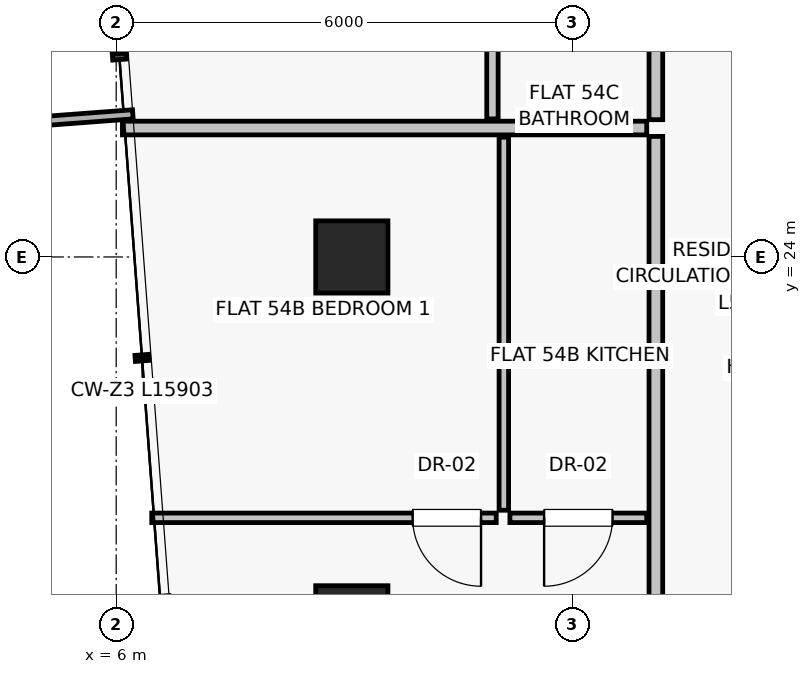
"""IFC4 building model, lengths in metres.
Left out: names, types, materials, properties, quantities, classifications, styles, units other than length and angle.
Written with IfcOpenShell. Run it as: python <this file> out.ifc"""

import sys

from ifc_helpers import new_model, si_unit, direction, frame, frame_2d, origin, origin_2d, place, context, subcontext, project, spatial, rectangle, extrude, source, transform, mapped, element, fill, save


model = new_model("IFC4")
c1 = context("Model", 3, precision=1e-05, world=origin(), true_north=direction((0.0, 1.0)))
c2 = subcontext(c1, "Body", "Model", "MODEL_VIEW")
j1 = project(units=[si_unit("LENGTHUNIT", "METRE"), si_unit("PLANEANGLEUNIT", "RADIAN")], contexts=[c1])
p1 = place(None, origin())
s1 = spatial("IfcSite", under=j1, at=p1, CompositionType="ELEMENT")
p2 = place(p1, origin())
s2 = spatial("IfcBuilding", under=s1, at=p2, CompositionType="ELEMENT")
p3 = place(p2, frame((0.0, 0.0, 191.85)))
s3 = spatial("IfcBuildingStorey", under=s2, at=p3, CompositionType="ELEMENT", Elevation=191.85)
for number, where, z_axis, x_axis in (
    (1, (9.1, 24.0, 0.0), (0.0, 0.0, 1.0), (1.0, 0.0, 0.0)),
    (2, (9.1, 19.2, 0.0), (0.0, 0.0, 1.0), (1.0, 0.0, 0.0)),
):
    element("IfcColumn", number, at=place(p3, frame(where, z_axis=z_axis, x_axis=x_axis)), inside=s3, PredefinedType="COLUMN", context=c2, shape_type="SweptSolid", body=[
        extrude(rectangle(XDim=0.95, YDim=0.95, at=origin_2d()), origin(), (0.0, 0.0, 1.0), 3.25),
    ])
p4 = place(p3, frame((13.1, 14.41, 0.0), z_axis=(0.0, 0.0, 1.0), x_axis=(0.0, 1.0, 0.0)))
e3 = element("IfcWall", 3, at=p4, inside=s3, PredefinedType="PARTITIONING", context=c2, shape_type="SweptSolid", body=[
    extrude(rectangle(XDim=11.176, YDim=0.18, at=frame_2d((5.588, 0.0))), origin(), (0.0, 0.0, 1.0), 2.662),
])
p5 = place(p4, frame((3.674, 0.0, 0.0)))
e4 = element("IfcOpeningElement", 4, at=p5, cuts=e3, PredefinedType="OPENING", context=c2, shape_type="SweptSolid", body=[
    extrude(rectangle(XDim=0.95, YDim=2.02, at=frame_2d((0.475, 1.01))), frame((0.0, 0.1, 0.0), z_axis=(0.0, -1.0, 0.0), x_axis=(1.0, 0.0, 0.0)), (0.0, 0.0, 1.0), 0.2),
])
p6 = place(p3, frame((12.98, 20.568, 0.0), z_axis=(0.0, 0.0, 1.0), x_axis=(-1.0, 0.0, 0.0)))
e5 = element("IfcWall", 5, at=p6, inside=s3, PredefinedType="PARTITIONING", context=c2, shape_type="SweptSolid", body=[
    extrude(rectangle(XDim=1.8, YDim=0.125, at=frame_2d((0.9, 0.0))), origin(), (0.0, 0.0, 1.0), 3.015),
])
p7 = place(p6, frame((0.45, 0.0, 0.0)))
e6 = element("IfcOpeningElement", 6, at=p7, cuts=e5, PredefinedType="OPENING", context=c2, shape_type="SweptSolid", body=[
    extrude(rectangle(XDim=0.9, YDim=2.01, at=frame_2d((0.45, 1.005))), frame((0.0, 0.073, 0.0), z_axis=(0.0, -1.0, 0.0), x_axis=(1.0, 0.0, 0.0)), (0.0, 0.0, 1.0), 0.145),
])
p8 = place(p3, frame((11.1, 20.668, 0.0), z_axis=(0.0, 0.0, 1.0), x_axis=(0.0, 1.0, 0.0)))
e7 = element("IfcWall", 7, at=p8, inside=s3, PredefinedType="PARTITIONING", context=c2, shape_type="SweptSolid", body=[
    extrude(rectangle(XDim=4.908, YDim=0.125, at=frame_2d((2.454, 0.0))), origin(), (0.0, 0.0, 1.0), 3.015),
])
p9 = place(p3, frame((11.0, 20.568, 0.0), z_axis=(0.0, 0.0, 1.0), x_axis=(-1.0, 0.0, 0.0)))
e8 = element("IfcWall", 8, at=p9, inside=s3, PredefinedType="PARTITIONING", context=c2, shape_type="SweptSolid", body=[
    extrude(rectangle(XDim=4.532, YDim=0.125, at=frame_2d((2.266, 0.0))), origin(), (0.0, 0.0, 1.0), 3.015),
])
p10 = place(p9, frame((0.2, 0.0, 0.0)))
e9 = element("IfcOpeningElement", 9, at=p10, cuts=e8, PredefinedType="OPENING", context=c2, shape_type="SweptSolid", body=[
    extrude(rectangle(XDim=0.9, YDim=2.01, at=frame_2d((0.45, 1.005))), frame((0.0, 0.073, 0.0), z_axis=(0.0, -1.0, 0.0), x_axis=(1.0, 0.0, 0.0)), (0.0, 0.0, 1.0), 0.145),
])
p11 = place(p3, frame((12.98, 25.696, 0.0), z_axis=(0.0, 0.0, 1.0), x_axis=(-1.0, 0.0, 0.0)))
e10 = element("IfcWall", 10, at=p11, inside=s3, PredefinedType="PARTITIONING", context=c2, shape_type="SweptSolid", body=[
    extrude(rectangle(XDim=6.898, YDim=0.18, at=frame_2d((3.449, 0.0))), origin(), (0.0, 0.0, 1.0), 3.015),
])
p12 = place(p3, frame((13.1, 25.806, 0.0), z_axis=(0.0, 0.0, 1.0), x_axis=(0.0, 1.0, 0.0)))
e11 = element("IfcWall", 11, at=p12, inside=s3, PredefinedType="PARTITIONING", context=c2, shape_type="SweptSolid", body=[
    extrude(rectangle(XDim=4.634, YDim=0.18, at=frame_2d((2.317, 0.0))), origin(), (0.0, 0.0, 1.0), 2.662),
])
p13 = place(p12, frame((2.63, 0.0, 0.0)))
e12 = element("IfcOpeningElement", 12, at=p13, cuts=e11, PredefinedType="OPENING", context=c2, shape_type="SweptSolid", body=[
    extrude(rectangle(XDim=0.95, YDim=2.02, at=frame_2d((0.475, 1.01))), frame((0.0, 0.1, 0.0), z_axis=(0.0, -1.0, 0.0), x_axis=(1.0, 0.0, 0.0)), (0.0, 0.0, 1.0), 0.2),
])
p14 = place(p3, frame((10.95, 25.816, 0.0), z_axis=(0.0, 0.0, 1.0), x_axis=(0.0, 1.0, 0.0)))
e13 = element("IfcWall", 13, at=p14, inside=s3, PredefinedType="PARTITIONING", context=c2, shape_type="SweptSolid", body=[
    extrude(rectangle(XDim=2.033, YDim=0.15, at=frame_2d((1.017, 0.0))), origin(), (0.0, 0.0, 1.0), 3.015),
])
m1 = source(origin(), c2, "Body", "SweptSolid", [
    extrude(rectangle(XDim=0.9, YDim=2.01, at=frame_2d((0.45, 1.005))), frame((0.0, 0.025, 0.0), z_axis=(0.0, -1.0, 0.0), x_axis=(1.0, 0.0, 0.0)), (0.0, 0.0, 1.0), 0.05),
])
p15 = place(p7, origin())
e14 = element("IfcDoor", 14, at=p15, inside=s3, OperationType="SINGLE_SWING_RIGHT", PredefinedType="DOOR", context=c2, shape_type="MappedRepresentation", body=[
    mapped(m1, transform((0.0, 0.0, 0.0), scale=1.0)),
])
fill(e6, e14)
p16 = place(p10, origin())
e15 = element("IfcDoor", 15, at=p16, inside=s3, OperationType="SINGLE_SWING_LEFT", PredefinedType="DOOR", context=c2, shape_type="MappedRepresentation", body=[
    mapped(m1, transform((0.0, 0.0, 0.0), scale=1.0)),
])
fill(e9, e15)
save(model, sys.argv[1])
